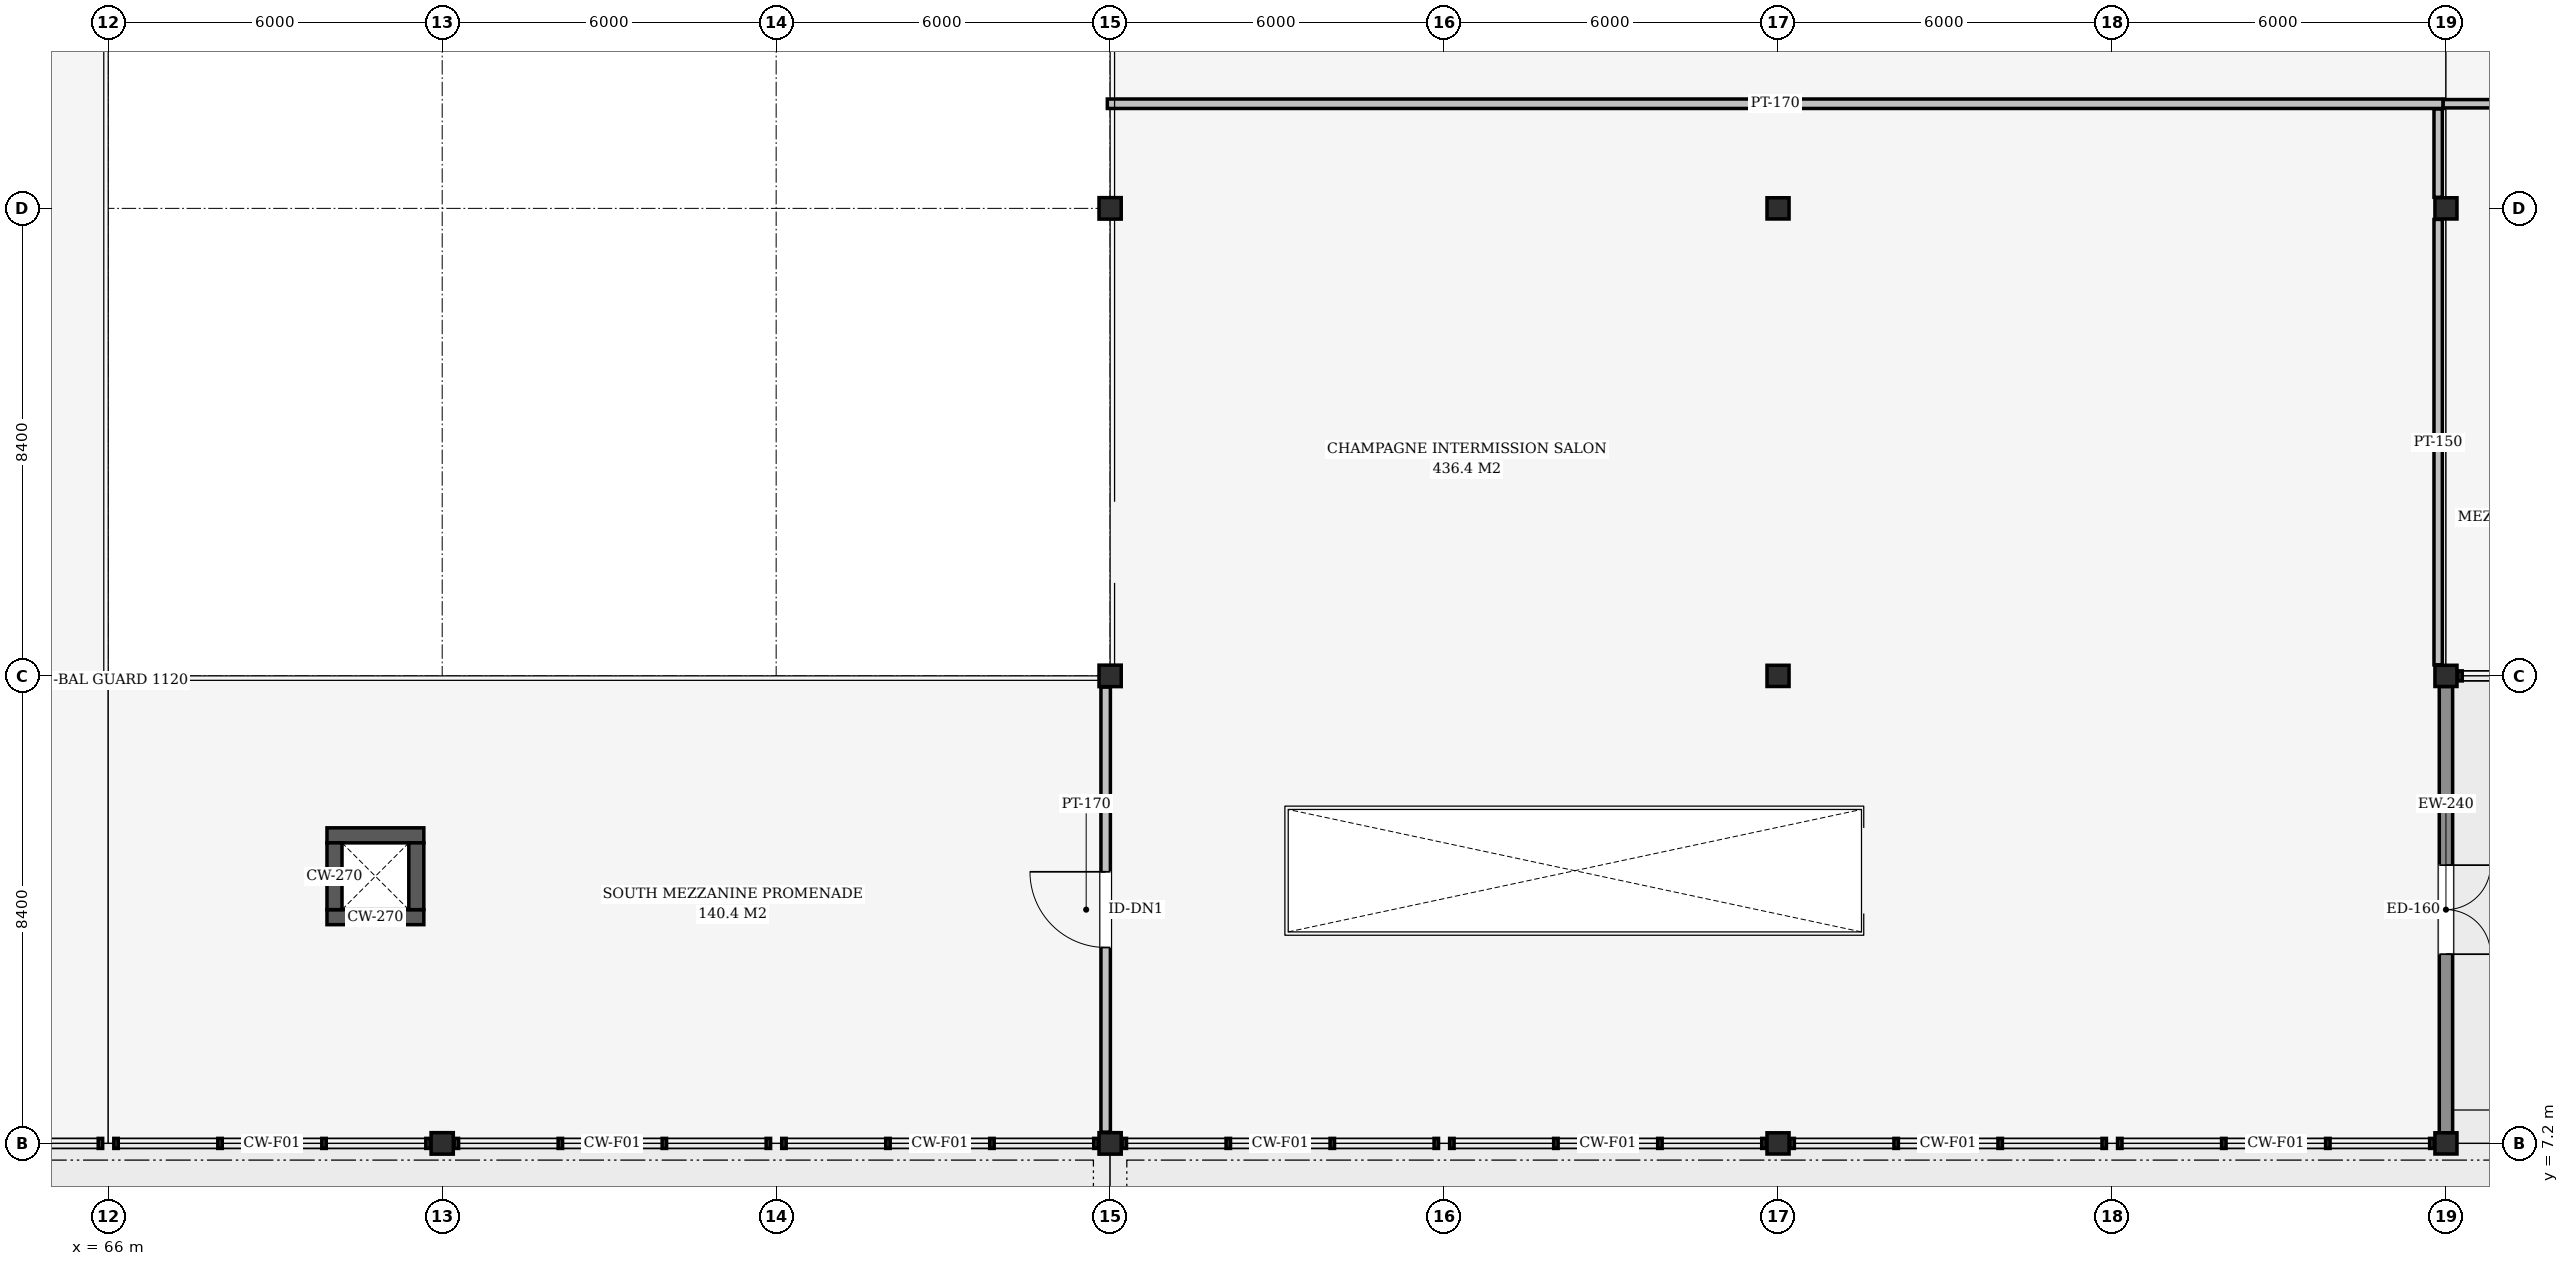
"""IFC4 building model, lengths in metres.
Left out: names, types, materials, properties, quantities, classifications, styles, units other than length and angle.
Written with IfcOpenShell. Run it as: python <this file> out.ifc"""

import sys

from ifc_helpers import new_model, si_unit, direction, frame, frame_2d, origin, origin_2d, place, context, subcontext, project, spatial, rectangle, i_section, extrude, element, fill, save


model = new_model("IFC4")
c1 = context("Model", 3, precision=1e-05, world=origin(), true_north=direction((0.0, 1.0)))
c2 = subcontext(c1, "Body", "Model", "MODEL_VIEW")
j1 = project(units=[si_unit("LENGTHUNIT", "METRE"), si_unit("PLANEANGLEUNIT", "RADIAN")], contexts=[c1])
p1 = place(None, origin())
s1 = spatial("IfcSite", under=j1, at=p1, CompositionType="ELEMENT")
p2 = place(p1, origin())
s2 = spatial("IfcBuilding", under=s1, at=p2, CompositionType="ELEMENT")
p3 = place(p2, frame((0.0, 0.0, 4.8)))
s3 = spatial("IfcBuildingStorey", under=s2, at=p3, CompositionType="ELEMENT", Elevation=4.8)
for number, where, z_axis, x_axis in (
    (1, (72.0, 7.2, 0.0), (0.0, 0.0, 1.0), (1.0, 0.0, 0.0)),
    (2, (84.0, 7.2, 0.0), (0.0, 0.0, 1.0), (1.0, 0.0, 0.0)),
    (3, (84.0, 15.6, 0.0), (0.0, 0.0, 1.0), (1.0, 0.0, 0.0)),
    (4, (84.0, 24.0, 0.0), (0.0, 0.0, 1.0), (1.0, 0.0, 0.0)),
):
    element("IfcColumn", number, at=place(p3, frame(where, z_axis=z_axis, x_axis=x_axis)), inside=s3, PredefinedType="COLUMN", context=c2, shape_type="SweptSolid", body=[
        extrude(i_section(OverallWidth=0.399, OverallDepth=0.386, WebThickness=0.021, FlangeThickness=0.033, at=origin_2d()), origin(), (0.0, 0.0, 1.0), 4.5),
    ])
for number, where, z_axis, x_axis in (
    (5, (96.0, 7.2, 0.0), (0.0, 0.0, 1.0), (1.0, 0.0, 0.0)),
    (6, (96.0, 15.6, 0.0), (0.0, 0.0, 1.0), (1.0, 0.0, 0.0)),
):
    element("IfcColumn", number, at=place(p3, frame(where, z_axis=z_axis, x_axis=x_axis)), inside=s3, PredefinedType="COLUMN", context=c2, shape_type="SweptSolid", body=[
        extrude(i_section(OverallWidth=0.396, OverallDepth=0.381, WebThickness=0.019, FlangeThickness=0.03, at=origin_2d()), origin(), (0.0, 0.0, 1.0), 4.26),
    ])
p4 = place(p3, frame((96.0, 24.0, 0.0), z_axis=(0.0, 0.0, 1.0), x_axis=(1.0, 0.0, 0.0)))
e7 = element("IfcColumn", 7, at=p4, inside=s3, PredefinedType="COLUMN", context=c2, shape_type="SweptSolid", body=[
    extrude(i_section(OverallWidth=0.396, OverallDepth=0.381, WebThickness=0.019, FlangeThickness=0.03, at=origin_2d()), origin(), (0.0, 0.0, 1.0), 4.5),
])
for number, where, z_axis, x_axis in (
    (8, (108.0, 7.2, 0.0), (0.0, 0.0, 1.0), (1.0, 0.0, 0.0)),
    (9, (108.0, 15.6, 0.0), (0.0, 0.0, 1.0), (1.0, 0.0, 0.0)),
):
    element("IfcColumn", number, at=place(p3, frame(where, z_axis=z_axis, x_axis=x_axis)), inside=s3, PredefinedType="COLUMN", context=c2, shape_type="SweptSolid", body=[
        extrude(i_section(OverallWidth=0.396, OverallDepth=0.381, WebThickness=0.019, FlangeThickness=0.03, at=origin_2d()), origin(), (0.0, 0.0, 1.0), 4.26),
    ])
p5 = place(p3, frame((108.0, 24.0, 0.0), z_axis=(0.0, 0.0, 1.0), x_axis=(1.0, 0.0, 0.0)))
e10 = element("IfcColumn", 10, at=p5, inside=s3, PredefinedType="COLUMN", context=c2, shape_type="SweptSolid", body=[
    extrude(i_section(OverallWidth=0.396, OverallDepth=0.381, WebThickness=0.019, FlangeThickness=0.03, at=origin_2d()), origin(), (0.0, 0.0, 1.0), 4.5),
])
p6 = place(p3, frame((108.0, 15.409, 0.0), z_axis=(0.0, 0.0, 1.0), x_axis=(0.0, -1.0, 0.0)))
e11 = element("IfcWall", 11, at=p6, inside=s3, PredefinedType="SOLIDWALL", context=c2, shape_type="SweptSolid", body=[
    extrude(rectangle(XDim=8.019, YDim=0.24, at=frame_2d((4.01, 0.0))), origin(), (0.0, 0.0, 1.0), 3.628),
])
p7 = place(p6, frame((3.209, 0.0, 0.0)))
e12 = element("IfcOpeningElement", 12, at=p7, cuts=e11, PredefinedType="OPENING", context=c2, shape_type="SweptSolid", body=[
    extrude(rectangle(XDim=1.6, YDim=2.3, at=frame_2d((0.8, 1.15))), frame((0.0, 0.13, 0.0), z_axis=(0.0, -1.0, 0.0), x_axis=(1.0, 0.0, 0.0)), (0.0, 0.0, 1.0), 0.26),
])
for number, where, z_axis, x_axis in (
    (13, (69.93, 11.265, 0.0), (0.0, 0.0, 1.0), (1.0, 0.0, 0.0)),
    (14, (69.93, 12.735, 0.0), (0.0, 0.0, 1.0), (1.0, 0.0, 0.0)),
):
    element("IfcWall", number, at=place(p3, frame(where, z_axis=z_axis, x_axis=x_axis)), inside=s3, PredefinedType="SHEAR", context=c2, shape_type="SweptSolid", body=[
        extrude(rectangle(XDim=1.74, YDim=0.27, at=frame_2d((0.87, 0.0))), origin(), (0.0, 0.0, 1.0), 4.25),
    ])
for number, where, z_axis, x_axis in (
    (15, (70.065, 11.4, 0.0), (0.0, 0.0, 1.0), (0.0, 1.0, 0.0)),
    (16, (71.535, 11.4, 0.0), (0.0, 0.0, 1.0), (0.0, 1.0, 0.0)),
):
    element("IfcWall", number, at=place(p3, frame(where, z_axis=z_axis, x_axis=x_axis)), inside=s3, PredefinedType="SHEAR", context=c2, shape_type="SweptSolid", body=[
        extrude(rectangle(XDim=1.2, YDim=0.27, at=frame_2d((0.6, 0.0))), origin(), (0.0, 0.0, 1.0), 4.25),
    ])
p8 = place(p3, frame((83.92, 7.401, 0.0), z_axis=(0.0, 0.0, 1.0), x_axis=(0.0, 1.0, 0.0)))
e17 = element("IfcWall", 17, at=p8, inside=s3, PredefinedType="PARTITIONING", context=c2, shape_type="SweptSolid", body=[
    extrude(rectangle(XDim=7.998, YDim=0.17, at=frame_2d((3.999, 0.0))), origin(), (0.0, 0.0, 1.0), 3.618),
])
p9 = place(p8, frame((3.319, 0.0, 0.0)))
e18 = element("IfcOpeningElement", 18, at=p9, cuts=e17, PredefinedType="OPENING", context=c2, shape_type="SweptSolid", body=[
    extrude(rectangle(XDim=1.36, YDim=2.2, at=frame_2d((0.68, 1.1))), frame((0.0, 0.095, 0.0), z_axis=(0.0, -1.0, 0.0), x_axis=(1.0, 0.0, 0.0)), (0.0, 0.0, 1.0), 0.19),
])
p10 = place(p3, frame((83.95, 25.88, 0.0), z_axis=(0.0, 0.0, 1.0), x_axis=(1.0, 0.0, 0.0)))
e19 = element("IfcWall", 19, at=p10, inside=s3, PredefinedType="PARTITIONING", context=c2, shape_type="SweptSolid", body=[
    extrude(rectangle(XDim=24.0, YDim=0.17, at=frame_2d((12.0, 0.0))), origin(), (0.0, 0.0, 1.0), 4.23),
])
p11 = place(p3, frame((107.86, 15.799, 0.0), z_axis=(0.0, 0.0, 1.0), x_axis=(0.0, 1.0, 0.0)))
e20 = element("IfcWall", 20, at=p11, inside=s3, PredefinedType="PARTITIONING", context=c2, shape_type="SweptSolid", body=[
    extrude(rectangle(XDim=8.003, YDim=0.15, at=frame_2d((4.001, 0.0))), origin(), (0.0, 0.0, 1.0), 3.628),
])
p12 = place(p3, frame((107.86, 24.198, 0.0), z_axis=(0.0, 0.0, 1.0), x_axis=(0.0, 1.0, 0.0)))
e21 = element("IfcWall", 21, at=p12, inside=s3, PredefinedType="PARTITIONING", context=c2, shape_type="SweptSolid", body=[
    extrude(rectangle(XDim=1.586, YDim=0.15, at=frame_2d((0.793, 0.0))), origin(), (0.0, 0.0, 1.0), 3.618),
])
p13 = place(p3, frame((107.95, 25.88, 0.0), z_axis=(0.0, 0.0, 1.0), x_axis=(1.0, 0.0, 0.0)))
e22 = element("IfcWall", 22, at=p13, inside=s3, PredefinedType="PARTITIONING", context=c2, shape_type="SweptSolid", body=[
    extrude(rectangle(XDim=9.235, YDim=0.15, at=frame_2d((4.618, 0.0))), origin(), (0.0, 0.0, 1.0), 4.23),
])
p14 = place(p13, frame((4.113, 0.0, 0.0)))
e23 = element("IfcOpeningElement", 23, at=p14, cuts=e22, PredefinedType="OPENING", context=c2, shape_type="SweptSolid", body=[
    extrude(rectangle(XDim=1.01, YDim=2.1, at=frame_2d((0.505, 1.05))), frame((0.0, 0.085, 0.0), z_axis=(0.0, -1.0, 0.0), x_axis=(1.0, 0.0, 0.0)), (0.0, 0.0, 1.0), 0.17),
])
p15 = place(p7, origin())
e24 = element("IfcDoor", 24, at=p15, inside=s3, OperationType="DOUBLE_DOOR_SINGLE_SWING", PredefinedType="DOOR", context=c2, shape_type="SweptSolid", body=[
    extrude(rectangle(XDim=1.6, YDim=2.3, at=frame_2d((0.8, 1.15))), frame((0.0, 0.025, 0.0), z_axis=(0.0, -1.0, 0.0), x_axis=(1.0, 0.0, 0.0)), (0.0, 0.0, 1.0), 0.05),
])
fill(e12, e24)
p16 = place(p9, origin())
e25 = element("IfcDoor", 25, at=p16, inside=s3, OperationType="SINGLE_SWING_RIGHT", PredefinedType="DOOR", context=c2, shape_type="SweptSolid", body=[
    extrude(rectangle(XDim=1.36, YDim=2.2, at=frame_2d((0.68, 1.1))), frame((0.0, 0.025, 0.0), z_axis=(0.0, -1.0, 0.0), x_axis=(1.0, 0.0, 0.0)), (0.0, 0.0, 1.0), 0.05),
])
fill(e18, e25)
save(model, sys.argv[1])
